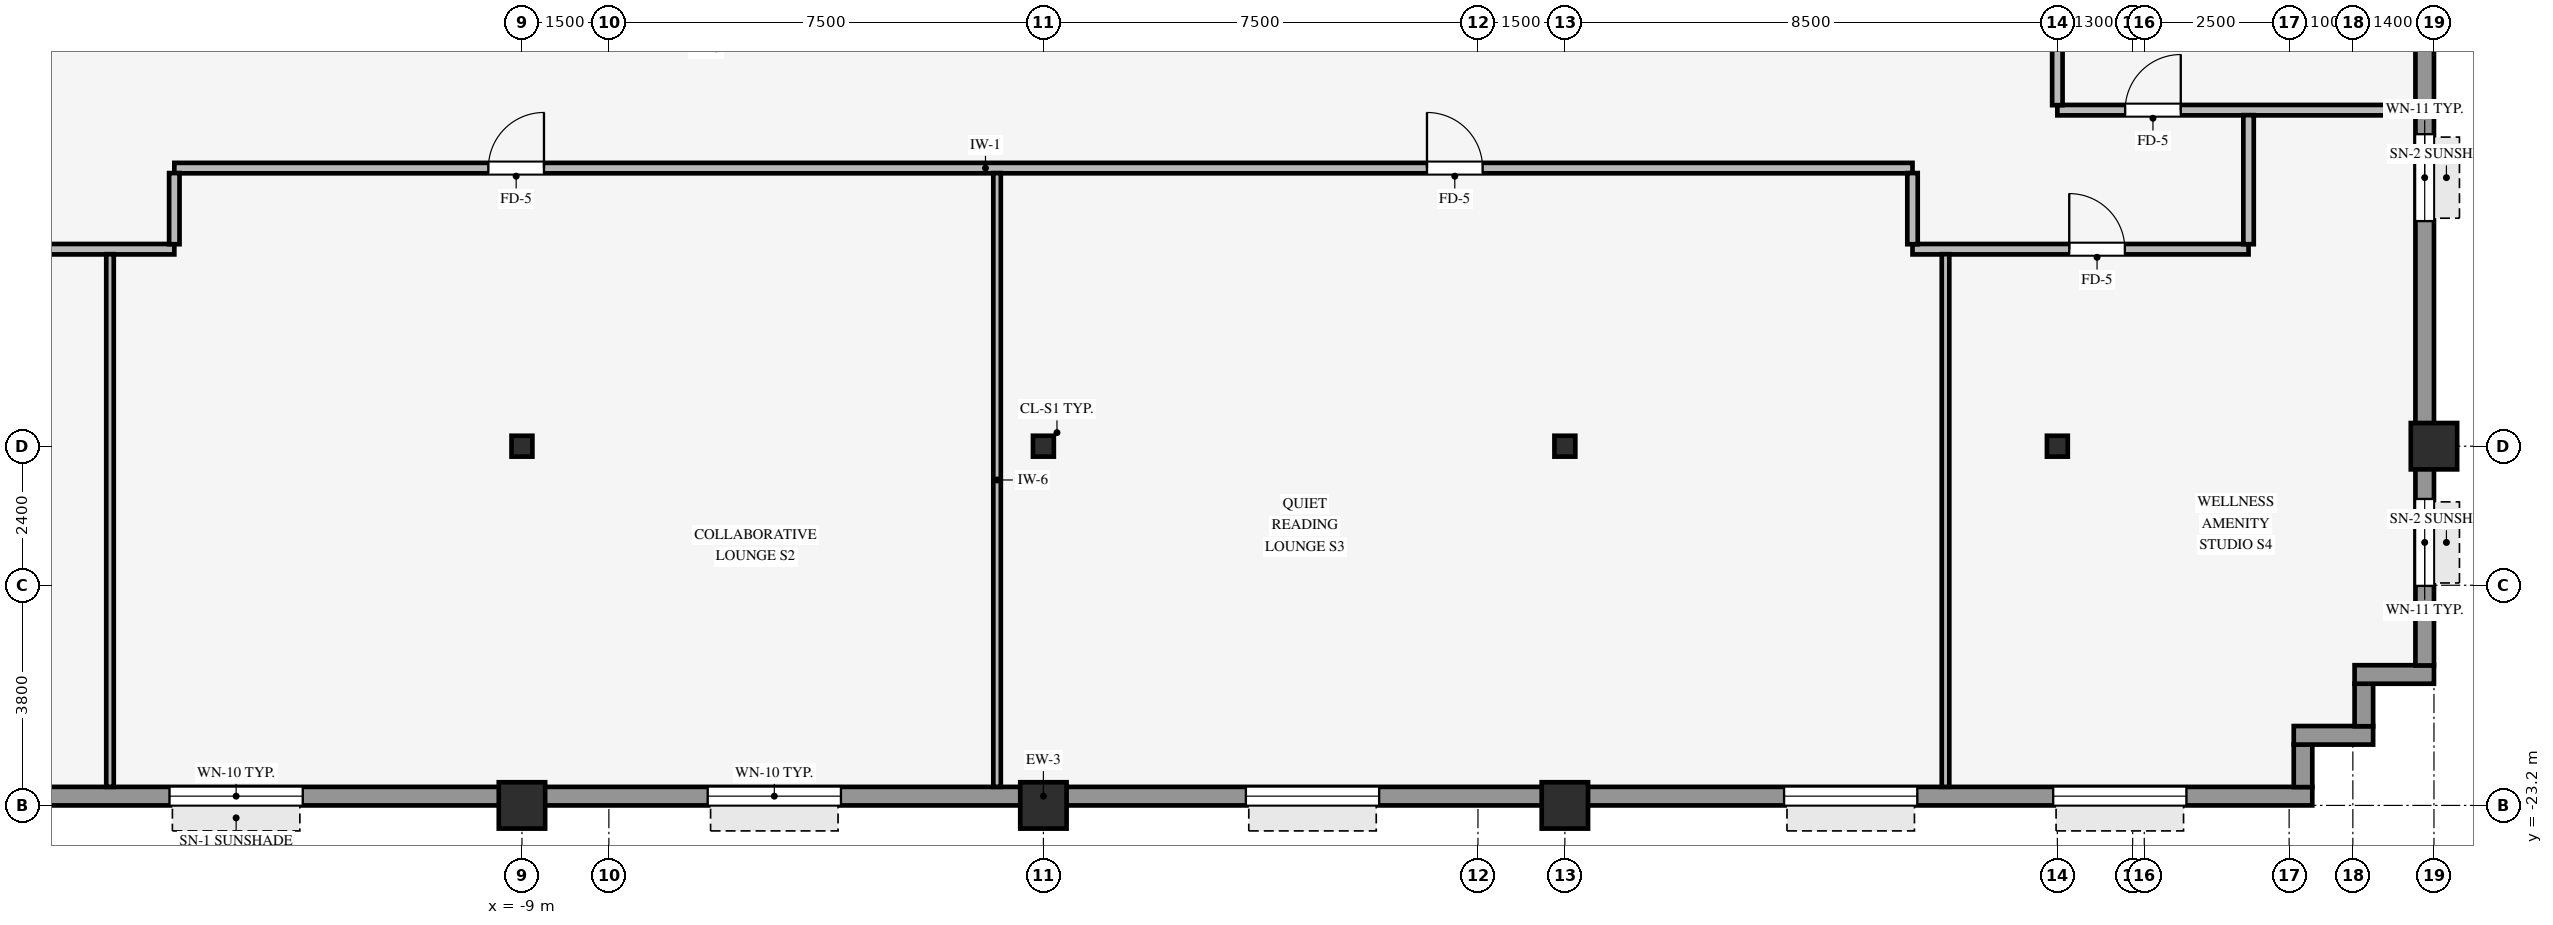
"""IFC4 building model, lengths in metres.
Left out: names, types, materials, properties, quantities, classifications, styles, units other than length and angle.
Written with IfcOpenShell. Run it as: python <this file> out.ifc"""

import sys

from ifc_helpers import new_model, si_unit, direction, frame, frame_2d, origin, origin_2d, place, context, subcontext, project, spatial, rectangle, hollow_rectangle, i_section, extrude, source, transform, mapped, element, fill, save


model = new_model("IFC4")
c1 = context("Model", 3, precision=1e-05, world=origin(), true_north=direction((0.0, 1.0)))
c2 = subcontext(c1, "Body", "Model", "MODEL_VIEW")
j1 = project(units=[si_unit("LENGTHUNIT", "METRE"), si_unit("PLANEANGLEUNIT", "RADIAN")], contexts=[c1])
p1 = place(None, origin())
s1 = spatial("IfcSite", under=j1, at=p1, CompositionType="ELEMENT")
p2 = place(p1, origin())
s2 = spatial("IfcBuilding", under=s1, at=p2, CompositionType="ELEMENT")
p3 = place(p2, frame((0.0, 0.0, 86.0)))
s3 = spatial("IfcBuildingStorey", under=s2, at=p3, CompositionType="ELEMENT", Elevation=86.0)
p4 = place(p3, frame((24.0, -17.0, -0.4), z_axis=(0.0, 0.0, 1.0), x_axis=(1.0, 0.0, 0.0)))
e1 = element("IfcColumn", 1, at=p4, inside=s3, PredefinedType="COLUMN", context=c2, shape_type="SweptSolid", body=[
    extrude(hollow_rectangle(XDim=0.8, YDim=0.8, WallThickness=0.055, InnerFilletRadius=0.055, OuterFilletRadius=0.11, at=origin_2d()), origin(), (0.0, 0.0, 1.0), 3.77),
])
for number, where, z_axis, x_axis in (
    (2, (-9.0, -23.2, 0.0), (0.0, 0.0, 1.0), (1.0, 0.0, 0.0)),
    (3, (0.0, -23.2, 0.0), (0.0, 0.0, 1.0), (1.0, 0.0, 0.0)),
    (4, (9.0, -23.2, 0.0), (0.0, 0.0, 1.0), (1.0, 0.0, 0.0)),
):
    element("IfcColumn", number, at=place(p3, frame(where, z_axis=z_axis, x_axis=x_axis)), inside=s3, PredefinedType="COLUMN", context=c2, shape_type="SweptSolid", body=[
        extrude(hollow_rectangle(XDim=0.8, YDim=0.8, WallThickness=0.055, InnerFilletRadius=0.055, OuterFilletRadius=0.11, at=origin_2d()), origin(), (0.0, 0.0, 1.0), 3.37),
    ])
for number, where, z_axis, x_axis in (
    (5, (0.0, -17.0, 0.0), (0.0, 0.0, 1.0), (1.0, 0.0, 0.0)),
    (6, (-9.0, -17.0, 0.0), (0.0, 0.0, 1.0), (1.0, 0.0, 0.0)),
    (7, (9.0, -17.0, 0.0), (0.0, 0.0, 1.0), (1.0, 0.0, 0.0)),
    (8, (17.5, -17.0, 0.0), (0.0, 0.0, 1.0), (1.0, 0.0, 0.0)),
):
    element("IfcColumn", number, at=place(p3, frame(where, z_axis=z_axis, x_axis=x_axis)), inside=s3, PredefinedType="COLUMN", context=c2, shape_type="SweptSolid", body=[
        extrude(i_section(OverallWidth=0.36, OverallDepth=0.36, WebThickness=0.021, FlangeThickness=0.021, FilletRadius=0.018, at=origin_2d()), origin(), (0.0, 0.0, 1.0), 3.37),
    ])
p5 = place(p3, frame((-21.9, -23.04, 0.0), z_axis=(0.0, 0.0, 1.0), x_axis=(1.0, 0.0, 0.0)))
e9 = element("IfcWall", 9, at=p5, inside=s3, PredefinedType="STANDARD", context=c2, shape_type="SweptSolid", body=[
    extrude(rectangle(XDim=43.8, YDim=0.32, at=frame_2d((21.9, 0.0))), origin(), (0.0, 0.0, 1.0), 2.705),
])
p6 = place(p5, frame((2.172, 0.0, 0.8)))
e10 = element("IfcOpeningElement", 10, at=p6, cuts=e9, PredefinedType="OPENING", context=c2, shape_type="SweptSolid", body=[
    extrude(rectangle(XDim=2.3, YDim=1.62, at=frame_2d((1.15, 0.81))), frame((0.0, 0.17, 0.0), z_axis=(0.0, -1.0, 0.0), x_axis=(1.0, 0.0, 0.0)), (0.0, 0.0, 1.0), 0.34),
])
p7 = place(p5, frame((6.817, 0.0, 0.8)))
e11 = element("IfcOpeningElement", 11, at=p7, cuts=e9, PredefinedType="OPENING", context=c2, shape_type="SweptSolid", body=[
    extrude(rectangle(XDim=2.3, YDim=1.62, at=frame_2d((1.15, 0.81))), frame((0.0, 0.17, 0.0), z_axis=(0.0, -1.0, 0.0), x_axis=(1.0, 0.0, 0.0)), (0.0, 0.0, 1.0), 0.34),
])
p8 = place(p5, frame((16.106, 0.0, 0.8)))
e12 = element("IfcOpeningElement", 12, at=p8, cuts=e9, PredefinedType="OPENING", context=c2, shape_type="SweptSolid", body=[
    extrude(rectangle(XDim=2.3, YDim=1.62, at=frame_2d((1.15, 0.81))), frame((0.0, 0.17, 0.0), z_axis=(0.0, -1.0, 0.0), x_axis=(1.0, 0.0, 0.0)), (0.0, 0.0, 1.0), 0.34),
])
p9 = place(p5, frame((25.394, 0.0, 0.8)))
e13 = element("IfcOpeningElement", 13, at=p9, cuts=e9, PredefinedType="OPENING", context=c2, shape_type="SweptSolid", body=[
    extrude(rectangle(XDim=2.3, YDim=1.62, at=frame_2d((1.15, 0.81))), frame((0.0, 0.17, 0.0), z_axis=(0.0, -1.0, 0.0), x_axis=(1.0, 0.0, 0.0)), (0.0, 0.0, 1.0), 0.34),
])
p10 = place(p5, frame((34.683, 0.0, 0.8)))
e14 = element("IfcOpeningElement", 14, at=p10, cuts=e9, PredefinedType="OPENING", context=c2, shape_type="SweptSolid", body=[
    extrude(rectangle(XDim=2.3, YDim=1.62, at=frame_2d((1.15, 0.81))), frame((0.0, 0.17, 0.0), z_axis=(0.0, -1.0, 0.0), x_axis=(1.0, 0.0, 0.0)), (0.0, 0.0, 1.0), 0.34),
])
p11 = place(p5, frame((39.328, 0.0, 0.8)))
e15 = element("IfcOpeningElement", 15, at=p11, cuts=e9, PredefinedType="OPENING", context=c2, shape_type="SweptSolid", body=[
    extrude(rectangle(XDim=2.3, YDim=1.62, at=frame_2d((1.15, 0.81))), frame((0.0, 0.17, 0.0), z_axis=(0.0, -1.0, 0.0), x_axis=(1.0, 0.0, 0.0)), (0.0, 0.0, 1.0), 0.34),
])
p12 = place(p3, frame((21.74, -22.884, 0.0), z_axis=(0.0, 0.0, 1.0), x_axis=(0.0, 1.0, 0.0)))
e16 = element("IfcWall", 16, at=p12, inside=s3, PredefinedType="STANDARD", context=c2, shape_type="SweptSolid", body=[
    extrude(rectangle(XDim=0.738, YDim=0.32, at=frame_2d((0.369, 0.0))), origin(), (0.0, 0.0, 1.0), 3.36),
])
p13 = place(p3, frame((21.58, -21.99, 0.0), z_axis=(0.0, 0.0, 1.0), x_axis=(1.0, 0.0, 0.0)))
e17 = element("IfcWall", 17, at=p13, inside=s3, PredefinedType="STANDARD", context=c2, shape_type="SweptSolid", body=[
    extrude(rectangle(XDim=1.37, YDim=0.32, at=frame_2d((0.685, 0.0))), origin(), (0.0, 0.0, 1.0), 3.36),
])
p14 = place(p3, frame((22.79, -21.834, 0.0), z_axis=(0.0, 0.0, 1.0), x_axis=(0.0, 1.0, 0.0)))
e18 = element("IfcWall", 18, at=p14, inside=s3, PredefinedType="STANDARD", context=c2, shape_type="SweptSolid", body=[
    extrude(rectangle(XDim=0.738, YDim=0.32, at=frame_2d((0.369, 0.0))), origin(), (0.0, 0.0, 1.0), 3.36),
])
p15 = place(p3, frame((22.63, -20.94, 0.0), z_axis=(0.0, 0.0, 1.0), x_axis=(1.0, 0.0, 0.0)))
e19 = element("IfcWall", 19, at=p15, inside=s3, PredefinedType="STANDARD", context=c2, shape_type="SweptSolid", body=[
    extrude(rectangle(XDim=1.37, YDim=0.32, at=frame_2d((0.685, 0.0))), origin(), (0.0, 0.0, 1.0), 3.36),
])
p16 = place(p3, frame((23.84, -20.784, 0.0), z_axis=(0.0, 0.0, 1.0), x_axis=(0.0, 1.0, 0.0)))
e20 = element("IfcWall", 20, at=p16, inside=s3, PredefinedType="STANDARD", context=c2, shape_type="SweptSolid", body=[
    extrude(rectangle(XDim=41.568, YDim=0.32, at=frame_2d((20.784, 0.0))), origin(), (0.0, 0.0, 1.0), 2.705),
])
p17 = place(p16, frame((26.034, 0.0, 0.0), z_axis=(0.0, 0.0, 1.0), x_axis=(-1.0, 0.0, 0.0)))
e21 = element("IfcOpeningElement", 21, at=p17, cuts=e20, PredefinedType="OPENING", context=c2, shape_type="SweptSolid", body=[
    extrude(rectangle(XDim=1.05, YDim=2.1, at=frame_2d((0.525, 1.05))), frame((0.0, 0.17, 0.0), z_axis=(0.0, -1.0, 0.0), x_axis=(1.0, 0.0, 0.0)), (0.0, 0.0, 1.0), 0.34),
])
p18 = place(p16, frame((1.373, 0.0, 0.8)))
e22 = element("IfcOpeningElement", 22, at=p18, cuts=e20, PredefinedType="OPENING", context=c2, shape_type="SweptSolid", body=[
    extrude(rectangle(XDim=1.5, YDim=1.6, at=frame_2d((0.75, 0.8))), frame((0.0, 0.17, 0.0), z_axis=(0.0, -1.0, 0.0), x_axis=(1.0, 0.0, 0.0)), (0.0, 0.0, 1.0), 0.34),
])
p19 = place(p16, frame((7.669, 0.0, 0.8)))
e23 = element("IfcOpeningElement", 23, at=p19, cuts=e20, PredefinedType="OPENING", context=c2, shape_type="SweptSolid", body=[
    extrude(rectangle(XDim=1.5, YDim=1.6, at=frame_2d((0.75, 0.8))), frame((0.0, 0.17, 0.0), z_axis=(0.0, -1.0, 0.0), x_axis=(1.0, 0.0, 0.0)), (0.0, 0.0, 1.0), 0.34),
])
p20 = place(p16, frame((12.615, 0.0, 0.8)))
e24 = element("IfcOpeningElement", 24, at=p20, cuts=e20, PredefinedType="OPENING", context=c2, shape_type="SweptSolid", body=[
    extrude(rectangle(XDim=1.5, YDim=1.6, at=frame_2d((0.75, 0.8))), frame((0.0, 0.17, 0.0), z_axis=(0.0, -1.0, 0.0), x_axis=(1.0, 0.0, 0.0)), (0.0, 0.0, 1.0), 0.34),
])
p21 = place(p16, frame((17.561, 0.0, 0.8)))
e25 = element("IfcOpeningElement", 25, at=p21, cuts=e20, PredefinedType="OPENING", context=c2, shape_type="SweptSolid", body=[
    extrude(rectangle(XDim=1.5, YDim=1.6, at=frame_2d((0.75, 0.8))), frame((0.0, 0.17, 0.0), z_axis=(0.0, -1.0, 0.0), x_axis=(1.0, 0.0, 0.0)), (0.0, 0.0, 1.0), 0.34),
])
p22 = place(p16, frame((22.507, 0.0, 0.8)))
e26 = element("IfcOpeningElement", 26, at=p22, cuts=e20, PredefinedType="OPENING", context=c2, shape_type="SweptSolid", body=[
    extrude(rectangle(XDim=1.5, YDim=1.6, at=frame_2d((0.75, 0.8))), frame((0.0, 0.17, 0.0), z_axis=(0.0, -1.0, 0.0), x_axis=(1.0, 0.0, 0.0)), (0.0, 0.0, 1.0), 0.34),
])
p23 = place(p16, frame((27.453, 0.0, 0.8)))
e27 = element("IfcOpeningElement", 27, at=p23, cuts=e20, PredefinedType="OPENING", context=c2, shape_type="SweptSolid", body=[
    extrude(rectangle(XDim=1.5, YDim=1.6, at=frame_2d((0.75, 0.8))), frame((0.0, 0.17, 0.0), z_axis=(0.0, -1.0, 0.0), x_axis=(1.0, 0.0, 0.0)), (0.0, 0.0, 1.0), 0.34),
])
p24 = place(p16, frame((32.399, 0.0, 0.8)))
e28 = element("IfcOpeningElement", 28, at=p24, cuts=e20, PredefinedType="OPENING", context=c2, shape_type="SweptSolid", body=[
    extrude(rectangle(XDim=1.5, YDim=1.6, at=frame_2d((0.75, 0.8))), frame((0.0, 0.17, 0.0), z_axis=(0.0, -1.0, 0.0), x_axis=(1.0, 0.0, 0.0)), (0.0, 0.0, 1.0), 0.34),
])
p25 = place(p16, frame((38.695, 0.0, 0.8)))
e29 = element("IfcOpeningElement", 29, at=p25, cuts=e20, PredefinedType="OPENING", context=c2, shape_type="SweptSolid", body=[
    extrude(rectangle(XDim=1.5, YDim=1.6, at=frame_2d((0.75, 0.8))), frame((0.0, 0.17, 0.0), z_axis=(0.0, -1.0, 0.0), x_axis=(1.0, 0.0, 0.0)), (0.0, 0.0, 1.0), 0.34),
])
p26 = place(p3, frame((-20.8, -13.6, 0.0), z_axis=(0.0, 0.0, 1.0), x_axis=(1.0, 0.0, 0.0)))
e30 = element("IfcWall", 30, at=p26, inside=s3, PredefinedType="PARTITIONING", context=c2, shape_type="SweptSolid", body=[
    extrude(rectangle(XDim=5.8, YDim=0.18, at=frame_2d((2.9, 0.0))), origin(), (0.0, 0.0, 1.0), 2.998),
])
p27 = place(p26, frame((1.865, 0.0, 0.0)))
e31 = element("IfcOpeningElement", 31, at=p27, cuts=e30, PredefinedType="OPENING", context=c2, shape_type="SweptSolid", body=[
    extrude(rectangle(XDim=0.96, YDim=2.1, at=frame_2d((0.48, 1.05))), frame((0.0, 0.1, 0.0), z_axis=(0.0, -1.0, 0.0), x_axis=(1.0, 0.0, 0.0)), (0.0, 0.0, 1.0), 0.2),
])
p28 = place(p3, frame((15.0, -13.6, 0.0), z_axis=(0.0, 0.0, 1.0), x_axis=(1.0, 0.0, 0.0)))
e32 = element("IfcWall", 32, at=p28, inside=s3, PredefinedType="PARTITIONING", context=c2, shape_type="SweptSolid", body=[
    extrude(rectangle(XDim=5.8, YDim=0.18, at=frame_2d((2.9, 0.0))), origin(), (0.0, 0.0, 1.0), 2.998),
])
p29 = place(p28, frame((2.705, 0.0, 0.0)))
e33 = element("IfcOpeningElement", 33, at=p29, cuts=e32, PredefinedType="OPENING", context=c2, shape_type="SweptSolid", body=[
    extrude(rectangle(XDim=0.96, YDim=2.1, at=frame_2d((0.48, 1.05))), frame((0.0, 0.1, 0.0), z_axis=(0.0, -1.0, 0.0), x_axis=(1.0, 0.0, 0.0)), (0.0, 0.0, 1.0), 0.2),
])
p30 = place(p3, frame((-15.0, -12.2, 0.0), z_axis=(0.0, 0.0, 1.0), x_axis=(1.0, 0.0, 0.0)))
e34 = element("IfcWall", 34, at=p30, inside=s3, PredefinedType="PARTITIONING", context=c2, shape_type="SweptSolid", body=[
    extrude(rectangle(XDim=30.0, YDim=0.18, at=frame_2d((15.0, 0.0))), origin(), (0.0, 0.0, 1.0), 3.36),
])
p31 = place(p30, frame((21.62, 0.0, 0.0)))
e35 = element("IfcOpeningElement", 35, at=p31, cuts=e34, PredefinedType="OPENING", context=c2, shape_type="SweptSolid", body=[
    extrude(rectangle(XDim=0.96, YDim=2.1, at=frame_2d((0.48, 1.05))), frame((0.0, 0.1, 0.0), z_axis=(0.0, -1.0, 0.0), x_axis=(1.0, 0.0, 0.0)), (0.0, 0.0, 1.0), 0.2),
])
p32 = place(p30, frame((5.42, 0.0, 0.0)))
e36 = element("IfcOpeningElement", 36, at=p32, cuts=e34, PredefinedType="OPENING", context=c2, shape_type="SweptSolid", body=[
    extrude(rectangle(XDim=0.96, YDim=2.1, at=frame_2d((0.48, 1.05))), frame((0.0, 0.1, 0.0), z_axis=(0.0, -1.0, 0.0), x_axis=(1.0, 0.0, 0.0)), (0.0, 0.0, 1.0), 0.2),
])
p33 = place(p3, frame((17.5, -11.2, 0.0), z_axis=(0.0, 0.0, 1.0), x_axis=(1.0, 0.0, 0.0)))
e37 = element("IfcWall", 37, at=p33, inside=s3, PredefinedType="PARTITIONING", context=c2, shape_type="SweptSolid", body=[
    extrude(rectangle(XDim=6.18, YDim=0.18, at=frame_2d((3.09, 0.0))), origin(), (0.0, 0.0, 1.0), 3.36),
])
p34 = place(p33, frame((1.17, 0.0, 0.0)))
e38 = element("IfcOpeningElement", 38, at=p34, cuts=e37, PredefinedType="OPENING", context=c2, shape_type="SweptSolid", body=[
    extrude(rectangle(XDim=0.96, YDim=2.1, at=frame_2d((0.48, 1.05))), frame((0.0, 0.1, 0.0), z_axis=(0.0, -1.0, 0.0), x_axis=(1.0, 0.0, 0.0)), (0.0, 0.0, 1.0), 0.2),
])
p35 = place(p3, frame((-16.11, -22.88, 0.0), z_axis=(0.0, 0.0, 1.0), x_axis=(0.0, 1.0, 0.0)))
e39 = element("IfcWall", 39, at=p35, inside=s3, PredefinedType="PARTITIONING", context=c2, shape_type="SweptSolid", body=[
    extrude(rectangle(XDim=9.194, YDim=0.13, at=frame_2d((4.597, 0.0))), origin(), (0.0, 0.0, 1.0), 3.36),
])
p36 = place(p3, frame((-15.0, -13.514, 0.0), z_axis=(0.0, 0.0, 1.0), x_axis=(0.0, 1.0, 0.0)))
e40 = element("IfcWall", 40, at=p36, inside=s3, PredefinedType="PARTITIONING", context=c2, shape_type="SweptSolid", body=[
    extrude(rectangle(XDim=1.228, YDim=0.18, at=frame_2d((0.614, 0.0))), origin(), (0.0, 0.0, 1.0), 3.36),
])
p37 = place(p3, frame((-0.8, -22.88, 0.0), z_axis=(0.0, 0.0, 1.0), x_axis=(0.0, 1.0, 0.0)))
e41 = element("IfcWall", 41, at=p37, inside=s3, PredefinedType="PARTITIONING", context=c2, shape_type="SweptSolid", body=[
    extrude(rectangle(XDim=10.594, YDim=0.13, at=frame_2d((5.297, 0.0))), origin(), (0.0, 0.0, 1.0), 3.36),
])
p38 = place(p3, frame((15.0, -13.514, 0.0), z_axis=(0.0, 0.0, 1.0), x_axis=(0.0, 1.0, 0.0)))
e42 = element("IfcWall", 42, at=p38, inside=s3, PredefinedType="PARTITIONING", context=c2, shape_type="SweptSolid", body=[
    extrude(rectangle(XDim=1.228, YDim=0.18, at=frame_2d((0.614, 0.0))), origin(), (0.0, 0.0, 1.0), 3.36),
])
p39 = place(p3, frame((15.57, -22.88, 0.0), z_axis=(0.0, 0.0, 1.0), x_axis=(0.0, 1.0, 0.0)))
e43 = element("IfcWall", 43, at=p39, inside=s3, PredefinedType="PARTITIONING", context=c2, shape_type="SweptSolid", body=[
    extrude(rectangle(XDim=9.194, YDim=0.13, at=frame_2d((4.597, 0.0))), origin(), (0.0, 0.0, 1.0), 3.36),
])
p40 = place(p3, frame((17.5, -11.114, 0.0), z_axis=(0.0, 0.0, 1.0), x_axis=(0.0, 1.0, 0.0)))
e44 = element("IfcWall", 44, at=p40, inside=s3, PredefinedType="PARTITIONING", context=c2, shape_type="SweptSolid", body=[
    extrude(rectangle(XDim=0.968, YDim=0.18, at=frame_2d((0.484, 0.0))), origin(), (0.0, 0.0, 1.0), 2.738),
])
p41 = place(p3, frame((20.8, -13.514, 0.0), z_axis=(0.0, 0.0, 1.0), x_axis=(0.0, 1.0, 0.0)))
e45 = element("IfcWall", 45, at=p41, inside=s3, PredefinedType="PARTITIONING", context=c2, shape_type="SweptSolid", body=[
    extrude(rectangle(XDim=2.228, YDim=0.18, at=frame_2d((1.114, 0.0))), origin(), (0.0, 0.0, 1.0), 3.36),
])
m1 = source(origin(), c2, "Body", "SweptSolid", [
    extrude(rectangle(XDim=2.3, YDim=1.62, at=frame_2d((1.15, 0.81))), frame((0.0, 0.03, 0.0), z_axis=(0.0, -1.0, 0.0), x_axis=(1.0, 0.0, 0.0)), (0.0, 0.0, 1.0), 0.06),
])
p42 = place(p7, origin())
e46 = element("IfcWindow", 46, at=p42, inside=s3, PartitioningType="SINGLE_PANEL", PredefinedType="WINDOW", context=c2, shape_type="MappedRepresentation", body=[
    mapped(m1, transform((0.0, 0.0, 0.0), scale=1.0)),
])
fill(e11, e46)
p43 = place(p8, origin())
e47 = element("IfcWindow", 47, at=p43, inside=s3, PartitioningType="SINGLE_PANEL", PredefinedType="WINDOW", context=c2, shape_type="MappedRepresentation", body=[
    mapped(m1, transform((0.0, 0.0, 0.0), scale=1.0)),
])
fill(e12, e47)
p44 = place(p9, origin())
e48 = element("IfcWindow", 48, at=p44, inside=s3, PartitioningType="SINGLE_PANEL", PredefinedType="WINDOW", context=c2, shape_type="MappedRepresentation", body=[
    mapped(m1, transform((0.0, 0.0, 0.0), scale=1.0)),
])
fill(e13, e48)
p45 = place(p10, origin())
e49 = element("IfcWindow", 49, at=p45, inside=s3, PartitioningType="SINGLE_PANEL", PredefinedType="WINDOW", context=c2, shape_type="MappedRepresentation", body=[
    mapped(m1, transform((0.0, 0.0, 0.0), scale=1.0)),
])
fill(e14, e49)
p46 = place(p11, origin())
e50 = element("IfcWindow", 50, at=p46, inside=s3, PartitioningType="SINGLE_PANEL", PredefinedType="WINDOW", context=c2, shape_type="MappedRepresentation", body=[
    mapped(m1, transform((0.0, 0.0, 0.0), scale=1.0)),
])
fill(e15, e50)
m2 = source(origin(), c2, "Body", "SweptSolid", [
    extrude(rectangle(XDim=1.5, YDim=1.6, at=frame_2d((0.75, 0.8))), frame((0.0, 0.03, 0.0), z_axis=(0.0, -1.0, 0.0), x_axis=(1.0, 0.0, 0.0)), (0.0, 0.0, 1.0), 0.06),
])
p47 = place(p18, origin())
e51 = element("IfcWindow", 51, at=p47, inside=s3, PartitioningType="SINGLE_PANEL", PredefinedType="WINDOW", context=c2, shape_type="MappedRepresentation", body=[
    mapped(m2, transform((0.0, 0.0, 0.0), scale=1.0)),
])
fill(e22, e51)
p48 = place(p19, origin())
e52 = element("IfcWindow", 52, at=p48, inside=s3, PartitioningType="SINGLE_PANEL", PredefinedType="WINDOW", context=c2, shape_type="MappedRepresentation", body=[
    mapped(m2, transform((0.0, 0.0, 0.0), scale=1.0)),
])
fill(e23, e52)
m3 = source(origin(), c2, "Body", "SweptSolid", [
    extrude(rectangle(XDim=0.96, YDim=2.1, at=frame_2d((0.48, 1.05))), frame((0.0, 0.025, 0.0), z_axis=(0.0, -1.0, 0.0), x_axis=(1.0, 0.0, 0.0)), (0.0, 0.0, 1.0), 0.05),
])
p49 = place(p31, origin())
e53 = element("IfcDoor", 53, at=p49, inside=s3, OperationType="SINGLE_SWING_LEFT", PredefinedType="DOOR", context=c2, shape_type="MappedRepresentation", body=[
    mapped(m3, transform((0.0, 0.0, 0.0), scale=1.0)),
])
fill(e35, e53)
p50 = place(p32, origin())
e54 = element("IfcDoor", 54, at=p50, inside=s3, OperationType="SINGLE_SWING_RIGHT", PredefinedType="DOOR", context=c2, shape_type="MappedRepresentation", body=[
    mapped(m3, transform((0.0, 0.0, 0.0), scale=1.0)),
])
fill(e36, e54)
p51 = place(p29, origin())
e55 = element("IfcDoor", 55, at=p51, inside=s3, OperationType="SINGLE_SWING_LEFT", PredefinedType="DOOR", context=c2, shape_type="MappedRepresentation", body=[
    mapped(m3, transform((0.0, 0.0, 0.0), scale=1.0)),
])
fill(e33, e55)
p52 = place(p34, origin())
e56 = element("IfcDoor", 56, at=p52, inside=s3, OperationType="SINGLE_SWING_RIGHT", PredefinedType="DOOR", context=c2, shape_type="MappedRepresentation", body=[
    mapped(m3, transform((0.0, 0.0, 0.0), scale=1.0)),
])
fill(e38, e56)
save(model, sys.argv[1])
